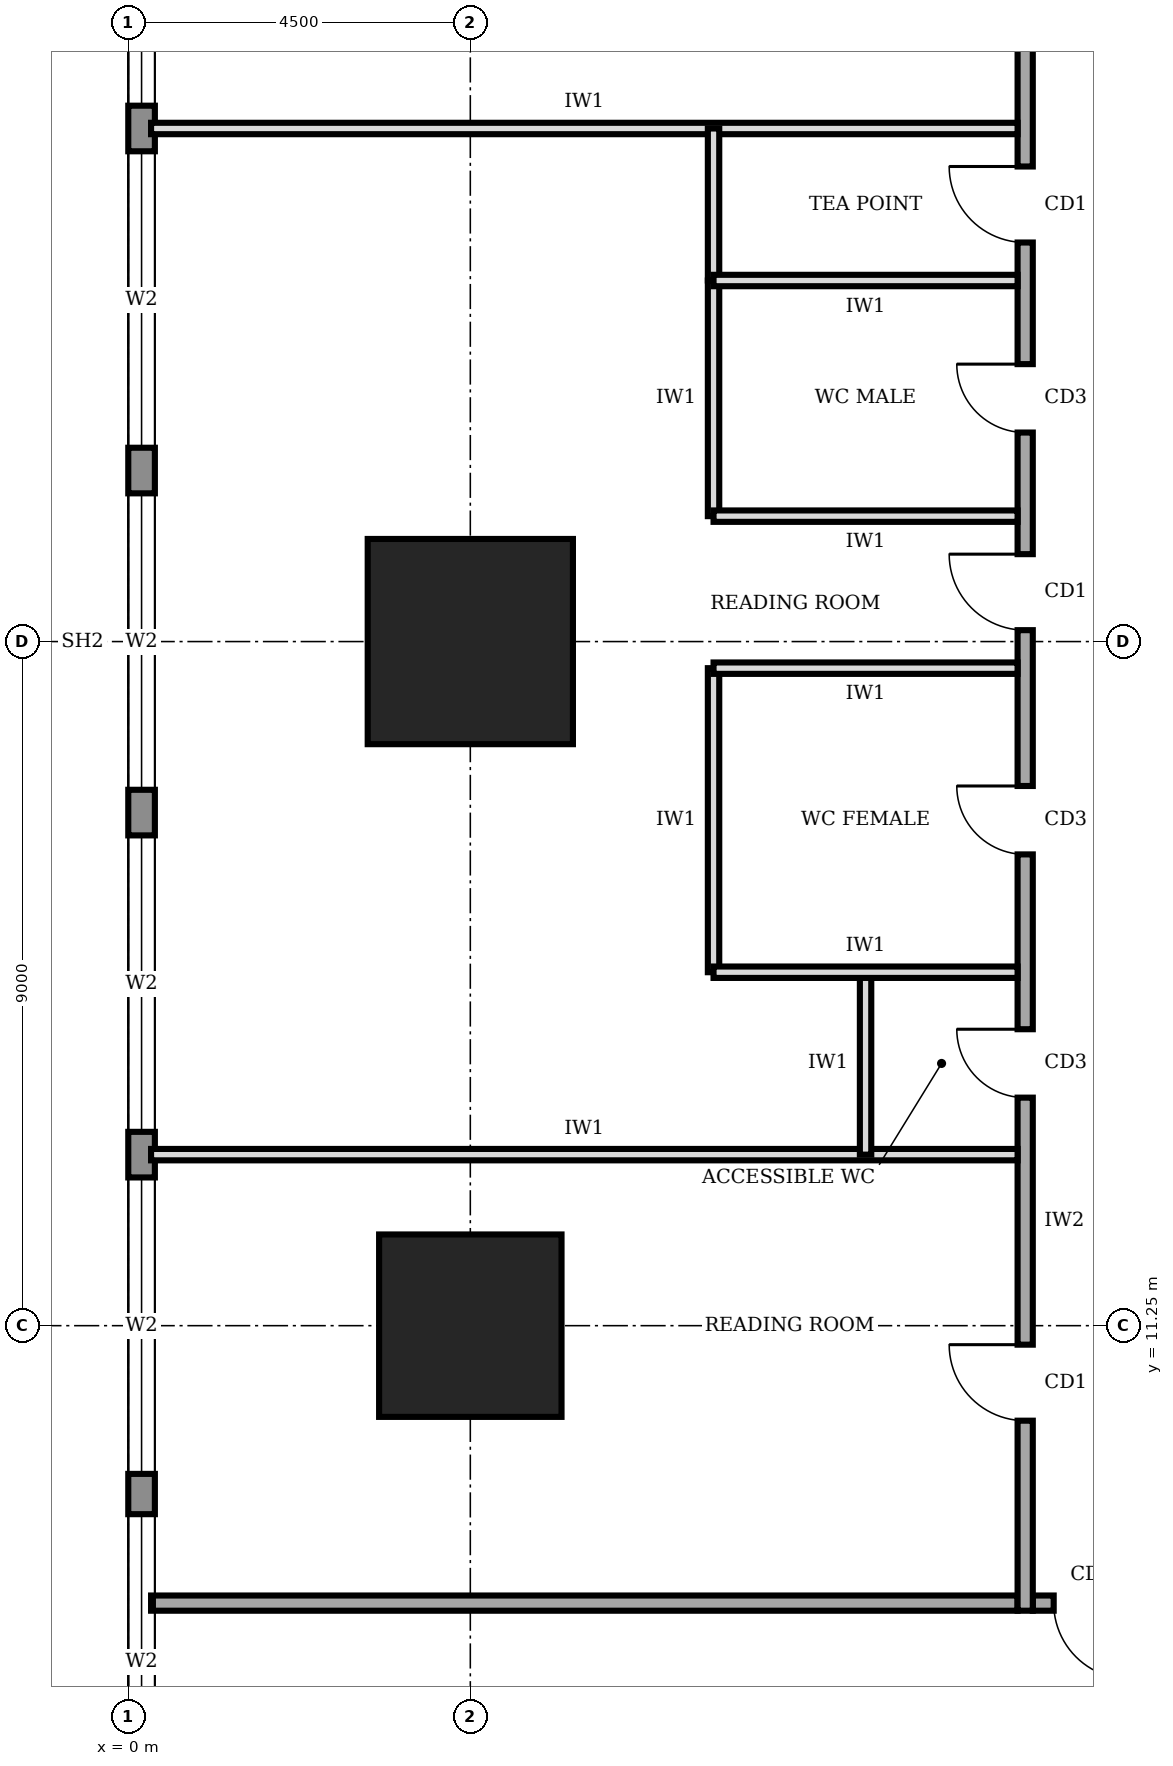
"""IFC4 building model, lengths in metres.
Left out: names, types, materials, properties, quantities, classifications, styles, units other than length and angle.
Written with IfcOpenShell. Run it as: python <this file> out.ifc"""

import sys

from ifc_helpers import new_model, si_unit, direction, frame, frame_2d, origin, origin_2d, place, context, subcontext, project, spatial, rectangle, extrude, element, fill, save


model = new_model("IFC4")
c1 = context("Model", 3, precision=1e-05, world=origin(), true_north=direction((0.0, 1.0)))
c2 = subcontext(c1, "Body", "Model", "MODEL_VIEW")
j1 = project(units=[si_unit("LENGTHUNIT", "METRE"), si_unit("PLANEANGLEUNIT", "RADIAN")], contexts=[c1])
p1 = place(None, origin())
s1 = spatial("IfcSite", under=j1, at=p1, CompositionType="ELEMENT")
p2 = place(p1, origin())
s2 = spatial("IfcBuilding", under=s1, at=p2, CompositionType="ELEMENT")
p3 = place(p2, frame((0.0, 0.0, 73.0)))
s3 = spatial("IfcBuildingStorey", under=s2, at=p3, CompositionType="ELEMENT", Elevation=73.0)
p4 = place(p3, frame((4.5, 11.25, 0.0), z_axis=(0.0, 0.0, 1.0), x_axis=(1.0, 0.0, 0.0)))
e1 = element("IfcColumn", 1, at=p4, inside=s3, PredefinedType="COLUMN", context=c2, shape_type="SweptSolid", body=[
    extrude(rectangle(XDim=2.4, YDim=2.4, at=origin_2d()), origin(), (0.0, 0.0, 1.0), 4.0),
])
p5 = place(p3, frame((4.5, 20.25, 0.0), z_axis=(0.0, 0.0, 1.0), x_axis=(1.0, 0.0, 0.0)))
e2 = element("IfcColumn", 2, at=p5, inside=s3, PredefinedType="COLUMN", context=c2, shape_type="SweptSolid", body=[
    extrude(rectangle(XDim=2.7, YDim=2.7, at=origin_2d()), origin(), (0.0, 0.0, 1.0), 4.0),
])
p6 = place(p3, frame((0.175, 35.98, 0.0), z_axis=(0.0, 0.0, 1.0), x_axis=(0.0, -1.0, 0.0)))
e3 = element("IfcWall", 3, at=p6, inside=s3, PredefinedType="STANDARD", context=c2, shape_type="SweptSolid", body=[
    extrude(rectangle(XDim=31.46, YDim=0.35, at=frame_2d((15.73, 0.0))), origin(), (0.0, 0.0, 1.0), 3.75),
])
p7 = place(p6, frame((27.21, 0.0, 0.6)))
e4 = element("IfcOpeningElement", 4, at=p7, cuts=e3, PredefinedType="OPENING", context=c2, shape_type="SweptSolid", body=[
    extrude(rectangle(XDim=3.9, YDim=2.6, at=frame_2d((1.95, 1.3))), frame((0.0, 0.185, 0.0), z_axis=(0.0, -1.0, 0.0), x_axis=(1.0, 0.0, 0.0)), (0.0, 0.0, 1.0), 0.37),
])
p8 = place(p6, frame((22.78, 0.0, 0.6)))
e5 = element("IfcOpeningElement", 5, at=p8, cuts=e3, PredefinedType="OPENING", context=c2, shape_type="SweptSolid", body=[
    extrude(rectangle(XDim=3.9, YDim=2.6, at=frame_2d((1.95, 1.3))), frame((0.0, 0.185, 0.0), z_axis=(0.0, -1.0, 0.0), x_axis=(1.0, 0.0, 0.0)), (0.0, 0.0, 1.0), 0.37),
])
p9 = place(p6, frame((18.28, 0.0, 0.6)))
e6 = element("IfcOpeningElement", 6, at=p9, cuts=e3, PredefinedType="OPENING", context=c2, shape_type="SweptSolid", body=[
    extrude(rectangle(XDim=3.9, YDim=2.6, at=frame_2d((1.95, 1.3))), frame((0.0, 0.185, 0.0), z_axis=(0.0, -1.0, 0.0), x_axis=(1.0, 0.0, 0.0)), (0.0, 0.0, 1.0), 0.37),
])
p10 = place(p6, frame((13.78, 0.0, 0.6)))
e7 = element("IfcOpeningElement", 7, at=p10, cuts=e3, PredefinedType="OPENING", context=c2, shape_type="SweptSolid", body=[
    extrude(rectangle(XDim=3.9, YDim=2.6, at=frame_2d((1.95, 1.3))), frame((0.0, 0.185, 0.0), z_axis=(0.0, -1.0, 0.0), x_axis=(1.0, 0.0, 0.0)), (0.0, 0.0, 1.0), 0.37),
])
p11 = place(p6, frame((9.28, 0.0, 0.6)))
e8 = element("IfcOpeningElement", 8, at=p11, cuts=e3, PredefinedType="OPENING", context=c2, shape_type="SweptSolid", body=[
    extrude(rectangle(XDim=3.9, YDim=2.6, at=frame_2d((1.95, 1.3))), frame((0.0, 0.185, 0.0), z_axis=(0.0, -1.0, 0.0), x_axis=(1.0, 0.0, 0.0)), (0.0, 0.0, 1.0), 0.37),
])
p12 = place(p6, frame((4.78, 0.0, 0.6)))
e9 = element("IfcOpeningElement", 9, at=p12, cuts=e3, PredefinedType="OPENING", context=c2, shape_type="SweptSolid", body=[
    extrude(rectangle(XDim=3.9, YDim=2.6, at=frame_2d((1.95, 1.3))), frame((0.0, 0.185, 0.0), z_axis=(0.0, -1.0, 0.0), x_axis=(1.0, 0.0, 0.0)), (0.0, 0.0, 1.0), 0.37),
])
p13 = place(p3, frame((11.9, 7.6, 0.0), z_axis=(0.0, 0.0, 1.0), x_axis=(1.0, 0.0, 0.0)))
e10 = element("IfcWall", 10, at=p13, inside=s3, PredefinedType="SOLIDWALL", context=c2, shape_type="SweptSolid", body=[
    extrude(rectangle(XDim=16.9, YDim=0.2, at=frame_2d((8.45, 0.0))), origin(), (0.0, 0.0, 1.0), 3.75),
])
p14 = place(p13, frame((0.275, 0.0, 0.0)))
e11 = element("IfcOpeningElement", 11, at=p14, cuts=e10, PredefinedType="OPENING", context=c2, shape_type="SweptSolid", body=[
    extrude(rectangle(XDim=1.0, YDim=2.1, at=frame_2d((0.5, 1.05))), frame((0.0, 0.11, 0.0), z_axis=(0.0, -1.0, 0.0), x_axis=(1.0, 0.0, 0.0)), (0.0, 0.0, 1.0), 0.22),
])
p15 = place(p13, frame((5.6, 0.0, 0.0)))
e12 = element("IfcOpeningElement", 12, at=p15, cuts=e10, PredefinedType="OPENING", context=c2, shape_type="SweptSolid", body=[
    extrude(rectangle(XDim=1.0, YDim=2.1, at=frame_2d((0.5, 1.05))), frame((0.0, 0.11, 0.0), z_axis=(0.0, -1.0, 0.0), x_axis=(1.0, 0.0, 0.0)), (0.0, 0.0, 1.0), 0.22),
])
p16 = place(p13, frame((12.85, 0.0, 0.0)))
e13 = element("IfcOpeningElement", 13, at=p16, cuts=e10, PredefinedType="OPENING", context=c2, shape_type="SweptSolid", body=[
    extrude(rectangle(XDim=1.8, YDim=2.1, at=frame_2d((0.9, 1.05))), frame((0.0, 0.11, 0.0), z_axis=(0.0, -1.0, 0.0), x_axis=(1.0, 0.0, 0.0)), (0.0, 0.0, 1.0), 0.22),
])
p17 = place(p3, frame((11.8, 32.8, 0.0), z_axis=(0.0, 0.0, 1.0), x_axis=(0.0, -1.0, 0.0)))
e14 = element("IfcWall", 14, at=p17, inside=s3, PredefinedType="SOLIDWALL", context=c2, shape_type="SweptSolid", body=[
    extrude(rectangle(XDim=25.3, YDim=0.2, at=frame_2d((12.65, 0.0))), origin(), (0.0, 0.0, 1.0), 3.75),
])
p18 = place(p17, frame((21.8, 0.0, 0.0)))
e15 = element("IfcOpeningElement", 15, at=p18, cuts=e14, PredefinedType="OPENING", context=c2, shape_type="SweptSolid", body=[
    extrude(rectangle(XDim=1.0, YDim=2.1, at=frame_2d((0.5, 1.05))), frame((0.0, 0.11, 0.0), z_axis=(0.0, -1.0, 0.0), x_axis=(1.0, 0.0, 0.0)), (0.0, 0.0, 1.0), 0.22),
])
p19 = place(p17, frame((17.65, 0.0, 0.0)))
e16 = element("IfcOpeningElement", 16, at=p19, cuts=e14, PredefinedType="OPENING", context=c2, shape_type="SweptSolid", body=[
    extrude(rectangle(XDim=0.9, YDim=2.1, at=frame_2d((0.45, 1.05))), frame((0.0, 0.11, 0.0), z_axis=(0.0, -1.0, 0.0), x_axis=(1.0, 0.0, 0.0)), (0.0, 0.0, 1.0), 0.22),
])
p20 = place(p17, frame((14.45, 0.0, 0.0)))
e17 = element("IfcOpeningElement", 17, at=p20, cuts=e14, PredefinedType="OPENING", context=c2, shape_type="SweptSolid", body=[
    extrude(rectangle(XDim=0.9, YDim=2.1, at=frame_2d((0.45, 1.05))), frame((0.0, 0.11, 0.0), z_axis=(0.0, -1.0, 0.0), x_axis=(1.0, 0.0, 0.0)), (0.0, 0.0, 1.0), 0.22),
])
p21 = place(p17, frame((8.9, 0.0, 0.0)))
e18 = element("IfcOpeningElement", 18, at=p21, cuts=e14, PredefinedType="OPENING", context=c2, shape_type="SweptSolid", body=[
    extrude(rectangle(XDim=0.9, YDim=2.1, at=frame_2d((0.45, 1.05))), frame((0.0, 0.11, 0.0), z_axis=(0.0, -1.0, 0.0), x_axis=(1.0, 0.0, 0.0)), (0.0, 0.0, 1.0), 0.22),
])
p22 = place(p17, frame((6.3, 0.0, 0.0)))
e19 = element("IfcOpeningElement", 19, at=p22, cuts=e14, PredefinedType="OPENING", context=c2, shape_type="SweptSolid", body=[
    extrude(rectangle(XDim=1.0, YDim=2.1, at=frame_2d((0.5, 1.05))), frame((0.0, 0.11, 0.0), z_axis=(0.0, -1.0, 0.0), x_axis=(1.0, 0.0, 0.0)), (0.0, 0.0, 1.0), 0.22),
])
p23 = place(p17, frame((11.4, 0.0, 0.0)))
e20 = element("IfcOpeningElement", 20, at=p23, cuts=e14, PredefinedType="OPENING", context=c2, shape_type="SweptSolid", body=[
    extrude(rectangle(XDim=1.0, YDim=2.1, at=frame_2d((0.5, 1.05))), frame((0.0, 0.11, 0.0), z_axis=(0.0, -1.0, 0.0), x_axis=(1.0, 0.0, 0.0)), (0.0, 0.0, 1.0), 0.22),
])
p24 = place(p17, frame((2.3, 0.0, 0.0)))
e21 = element("IfcOpeningElement", 21, at=p24, cuts=e14, PredefinedType="OPENING", context=c2, shape_type="SweptSolid", body=[
    extrude(rectangle(XDim=1.0, YDim=2.1, at=frame_2d((0.5, 1.05))), frame((0.0, 0.11, 0.0), z_axis=(0.0, -1.0, 0.0), x_axis=(1.0, 0.0, 0.0)), (0.0, 0.0, 1.0), 0.22),
])
p25 = place(p3, frame((0.3, 7.6, 0.0), z_axis=(0.0, 0.0, 1.0), x_axis=(1.0, 0.0, 0.0)))
e22 = element("IfcWall", 22, at=p25, inside=s3, PredefinedType="SOLIDWALL", context=c2, shape_type="SweptSolid", body=[
    extrude(rectangle(XDim=11.4, YDim=0.2, at=frame_2d((5.7, 0.0))), origin(), (0.0, 0.0, 1.0), 3.75),
])
for number, where, z_axis, x_axis in (
    (23, (0.3, 13.5, 0.0), (0.0, 0.0, 1.0), (1.0, 0.0, 0.0)),
    (24, (0.3, 27.0, 0.0), (0.0, 0.0, 1.0), (1.0, 0.0, 0.0)),
):
    element("IfcWall", number, at=place(p3, frame(where, z_axis=z_axis, x_axis=x_axis)), inside=s3, PredefinedType="PARTITIONING", context=c2, shape_type="SweptSolid", body=[
        extrude(rectangle(XDim=11.4, YDim=0.15, at=frame_2d((5.7, 0.0))), origin(), (0.0, 0.0, 1.0), 3.75),
    ])
for number, where, z_axis, x_axis in (
    (25, (11.7, 15.9, 0.0), (0.0, 0.0, 1.0), (-1.0, 0.0, 0.0)),
    (26, (11.7, 19.9, 0.0), (0.0, 0.0, 1.0), (-1.0, 0.0, 0.0)),
    (27, (11.7, 21.9, 0.0), (0.0, 0.0, 1.0), (-1.0, 0.0, 0.0)),
    (28, (11.7, 25.0, 0.0), (0.0, 0.0, 1.0), (-1.0, 0.0, 0.0)),
):
    element("IfcWall", number, at=place(p3, frame(where, z_axis=z_axis, x_axis=x_axis)), inside=s3, PredefinedType="PARTITIONING", context=c2, shape_type="SweptSolid", body=[
        extrude(rectangle(XDim=4.0, YDim=0.15, at=frame_2d((2.0, 0.0))), origin(), (0.0, 0.0, 1.0), 3.75),
    ])
p26 = place(p3, frame((9.7, 13.5, 0.0), z_axis=(0.0, 0.0, 1.0), x_axis=(0.0, 1.0, 0.0)))
e29 = element("IfcWall", 29, at=p26, inside=s3, PredefinedType="PARTITIONING", context=c2, shape_type="SweptSolid", body=[
    extrude(rectangle(XDim=2.4, YDim=0.15, at=frame_2d((1.2, 0.0))), origin(), (0.0, 0.0, 1.0), 3.75),
])
p27 = place(p3, frame((7.7, 15.9, 0.0), z_axis=(0.0, 0.0, 1.0), x_axis=(0.0, 1.0, 0.0)))
e30 = element("IfcWall", 30, at=p27, inside=s3, PredefinedType="PARTITIONING", context=c2, shape_type="SweptSolid", body=[
    extrude(rectangle(XDim=4.0, YDim=0.15, at=frame_2d((2.0, 0.0))), origin(), (0.0, 0.0, 1.0), 3.75),
])
p28 = place(p3, frame((7.7, 21.9, 0.0), z_axis=(0.0, 0.0, 1.0), x_axis=(0.0, 1.0, 0.0)))
e31 = element("IfcWall", 31, at=p28, inside=s3, PredefinedType="PARTITIONING", context=c2, shape_type="SweptSolid", body=[
    extrude(rectangle(XDim=3.1, YDim=0.15, at=frame_2d((1.55, 0.0))), origin(), (0.0, 0.0, 1.0), 3.75),
])
p29 = place(p3, frame((7.7, 25.0, 0.0), z_axis=(0.0, 0.0, 1.0), x_axis=(0.0, 1.0, 0.0)))
e32 = element("IfcWall", 32, at=p29, inside=s3, PredefinedType="PARTITIONING", context=c2, shape_type="SweptSolid", body=[
    extrude(rectangle(XDim=2.0, YDim=0.15, at=frame_2d((1.0, 0.0))), origin(), (0.0, 0.0, 1.0), 3.75),
])
p30 = place(p7, origin())
e33 = element("IfcWindow", 33, at=p30, inside=s3, PartitioningType="SINGLE_PANEL", PredefinedType="WINDOW", context=c2, shape_type="SweptSolid", body=[
    extrude(rectangle(XDim=3.9, YDim=2.6, at=frame_2d((1.95, 1.3))), frame((0.0, 0.03, 0.0), z_axis=(0.0, -1.0, 0.0), x_axis=(1.0, 0.0, 0.0)), (0.0, 0.0, 1.0), 0.06),
])
fill(e4, e33)
p31 = place(p8, origin())
e34 = element("IfcWindow", 34, at=p31, inside=s3, PartitioningType="SINGLE_PANEL", PredefinedType="WINDOW", context=c2, shape_type="SweptSolid", body=[
    extrude(rectangle(XDim=3.9, YDim=2.6, at=frame_2d((1.95, 1.3))), frame((0.0, 0.03, 0.0), z_axis=(0.0, -1.0, 0.0), x_axis=(1.0, 0.0, 0.0)), (0.0, 0.0, 1.0), 0.06),
])
fill(e5, e34)
p32 = place(p9, origin())
e35 = element("IfcWindow", 35, at=p32, inside=s3, PartitioningType="SINGLE_PANEL", PredefinedType="WINDOW", context=c2, shape_type="SweptSolid", body=[
    extrude(rectangle(XDim=3.9, YDim=2.6, at=frame_2d((1.95, 1.3))), frame((0.0, 0.03, 0.0), z_axis=(0.0, -1.0, 0.0), x_axis=(1.0, 0.0, 0.0)), (0.0, 0.0, 1.0), 0.06),
])
fill(e6, e35)
p33 = place(p10, origin())
e36 = element("IfcWindow", 36, at=p33, inside=s3, PartitioningType="SINGLE_PANEL", PredefinedType="WINDOW", context=c2, shape_type="SweptSolid", body=[
    extrude(rectangle(XDim=3.9, YDim=2.6, at=frame_2d((1.95, 1.3))), frame((0.0, 0.03, 0.0), z_axis=(0.0, -1.0, 0.0), x_axis=(1.0, 0.0, 0.0)), (0.0, 0.0, 1.0), 0.06),
])
fill(e7, e36)
p34 = place(p11, origin())
e37 = element("IfcWindow", 37, at=p34, inside=s3, PartitioningType="SINGLE_PANEL", PredefinedType="WINDOW", context=c2, shape_type="SweptSolid", body=[
    extrude(rectangle(XDim=3.9, YDim=2.6, at=frame_2d((1.95, 1.3))), frame((0.0, 0.03, 0.0), z_axis=(0.0, -1.0, 0.0), x_axis=(1.0, 0.0, 0.0)), (0.0, 0.0, 1.0), 0.06),
])
fill(e8, e37)
p35 = place(p12, origin())
e38 = element("IfcWindow", 38, at=p35, inside=s3, PartitioningType="SINGLE_PANEL", PredefinedType="WINDOW", context=c2, shape_type="SweptSolid", body=[
    extrude(rectangle(XDim=3.9, YDim=2.6, at=frame_2d((1.95, 1.3))), frame((0.0, 0.03, 0.0), z_axis=(0.0, -1.0, 0.0), x_axis=(1.0, 0.0, 0.0)), (0.0, 0.0, 1.0), 0.06),
])
fill(e9, e38)
p36 = place(p14, frame((1.0, 0.0, 0.0), z_axis=(0.0, 0.0, 1.0), x_axis=(-1.0, 0.0, 0.0)))
e39 = element("IfcDoor", 39, at=p36, inside=s3, OperationType="SINGLE_SWING_LEFT", PredefinedType="DOOR", context=c2, shape_type="SweptSolid", body=[
    extrude(rectangle(XDim=1.0, YDim=2.1, at=frame_2d((0.5, 1.05))), frame((0.0, 0.025, 0.0), z_axis=(0.0, -1.0, 0.0), x_axis=(1.0, 0.0, 0.0)), (0.0, 0.0, 1.0), 0.05),
])
fill(e11, e39)
p37 = place(p18, frame((1.0, 0.0, 0.0), z_axis=(0.0, 0.0, 1.0), x_axis=(-1.0, 0.0, 0.0)))
e40 = element("IfcDoor", 40, at=p37, inside=s3, OperationType="SINGLE_SWING_RIGHT", PredefinedType="DOOR", context=c2, shape_type="SweptSolid", body=[
    extrude(rectangle(XDim=1.0, YDim=2.1, at=frame_2d((0.5, 1.05))), frame((0.0, 0.025, 0.0), z_axis=(0.0, -1.0, 0.0), x_axis=(1.0, 0.0, 0.0)), (0.0, 0.0, 1.0), 0.05),
])
fill(e15, e40)
p38 = place(p19, frame((0.9, 0.0, 0.0), z_axis=(0.0, 0.0, 1.0), x_axis=(-1.0, 0.0, 0.0)))
e41 = element("IfcDoor", 41, at=p38, inside=s3, OperationType="SINGLE_SWING_RIGHT", PredefinedType="DOOR", context=c2, shape_type="SweptSolid", body=[
    extrude(rectangle(XDim=0.9, YDim=2.1, at=frame_2d((0.45, 1.05))), frame((0.0, 0.025, 0.0), z_axis=(0.0, -1.0, 0.0), x_axis=(1.0, 0.0, 0.0)), (0.0, 0.0, 1.0), 0.05),
])
fill(e16, e41)
p39 = place(p20, frame((0.9, 0.0, 0.0), z_axis=(0.0, 0.0, 1.0), x_axis=(-1.0, 0.0, 0.0)))
e42 = element("IfcDoor", 42, at=p39, inside=s3, OperationType="SINGLE_SWING_RIGHT", PredefinedType="DOOR", context=c2, shape_type="SweptSolid", body=[
    extrude(rectangle(XDim=0.9, YDim=2.1, at=frame_2d((0.45, 1.05))), frame((0.0, 0.025, 0.0), z_axis=(0.0, -1.0, 0.0), x_axis=(1.0, 0.0, 0.0)), (0.0, 0.0, 1.0), 0.05),
])
fill(e17, e42)
p40 = place(p21, frame((0.9, 0.0, 0.0), z_axis=(0.0, 0.0, 1.0), x_axis=(-1.0, 0.0, 0.0)))
e43 = element("IfcDoor", 43, at=p40, inside=s3, OperationType="SINGLE_SWING_RIGHT", PredefinedType="DOOR", context=c2, shape_type="SweptSolid", body=[
    extrude(rectangle(XDim=0.9, YDim=2.1, at=frame_2d((0.45, 1.05))), frame((0.0, 0.025, 0.0), z_axis=(0.0, -1.0, 0.0), x_axis=(1.0, 0.0, 0.0)), (0.0, 0.0, 1.0), 0.05),
])
fill(e18, e43)
p41 = place(p22, frame((1.0, 0.0, 0.0), z_axis=(0.0, 0.0, 1.0), x_axis=(-1.0, 0.0, 0.0)))
e44 = element("IfcDoor", 44, at=p41, inside=s3, OperationType="SINGLE_SWING_RIGHT", PredefinedType="DOOR", context=c2, shape_type="SweptSolid", body=[
    extrude(rectangle(XDim=1.0, YDim=2.1, at=frame_2d((0.5, 1.05))), frame((0.0, 0.025, 0.0), z_axis=(0.0, -1.0, 0.0), x_axis=(1.0, 0.0, 0.0)), (0.0, 0.0, 1.0), 0.05),
])
fill(e19, e44)
p42 = place(p23, frame((1.0, 0.0, 0.0), z_axis=(0.0, 0.0, 1.0), x_axis=(-1.0, 0.0, 0.0)))
e45 = element("IfcDoor", 45, at=p42, inside=s3, OperationType="SINGLE_SWING_RIGHT", PredefinedType="DOOR", context=c2, shape_type="SweptSolid", body=[
    extrude(rectangle(XDim=1.0, YDim=2.1, at=frame_2d((0.5, 1.05))), frame((0.0, 0.025, 0.0), z_axis=(0.0, -1.0, 0.0), x_axis=(1.0, 0.0, 0.0)), (0.0, 0.0, 1.0), 0.05),
])
fill(e20, e45)
save(model, sys.argv[1])
